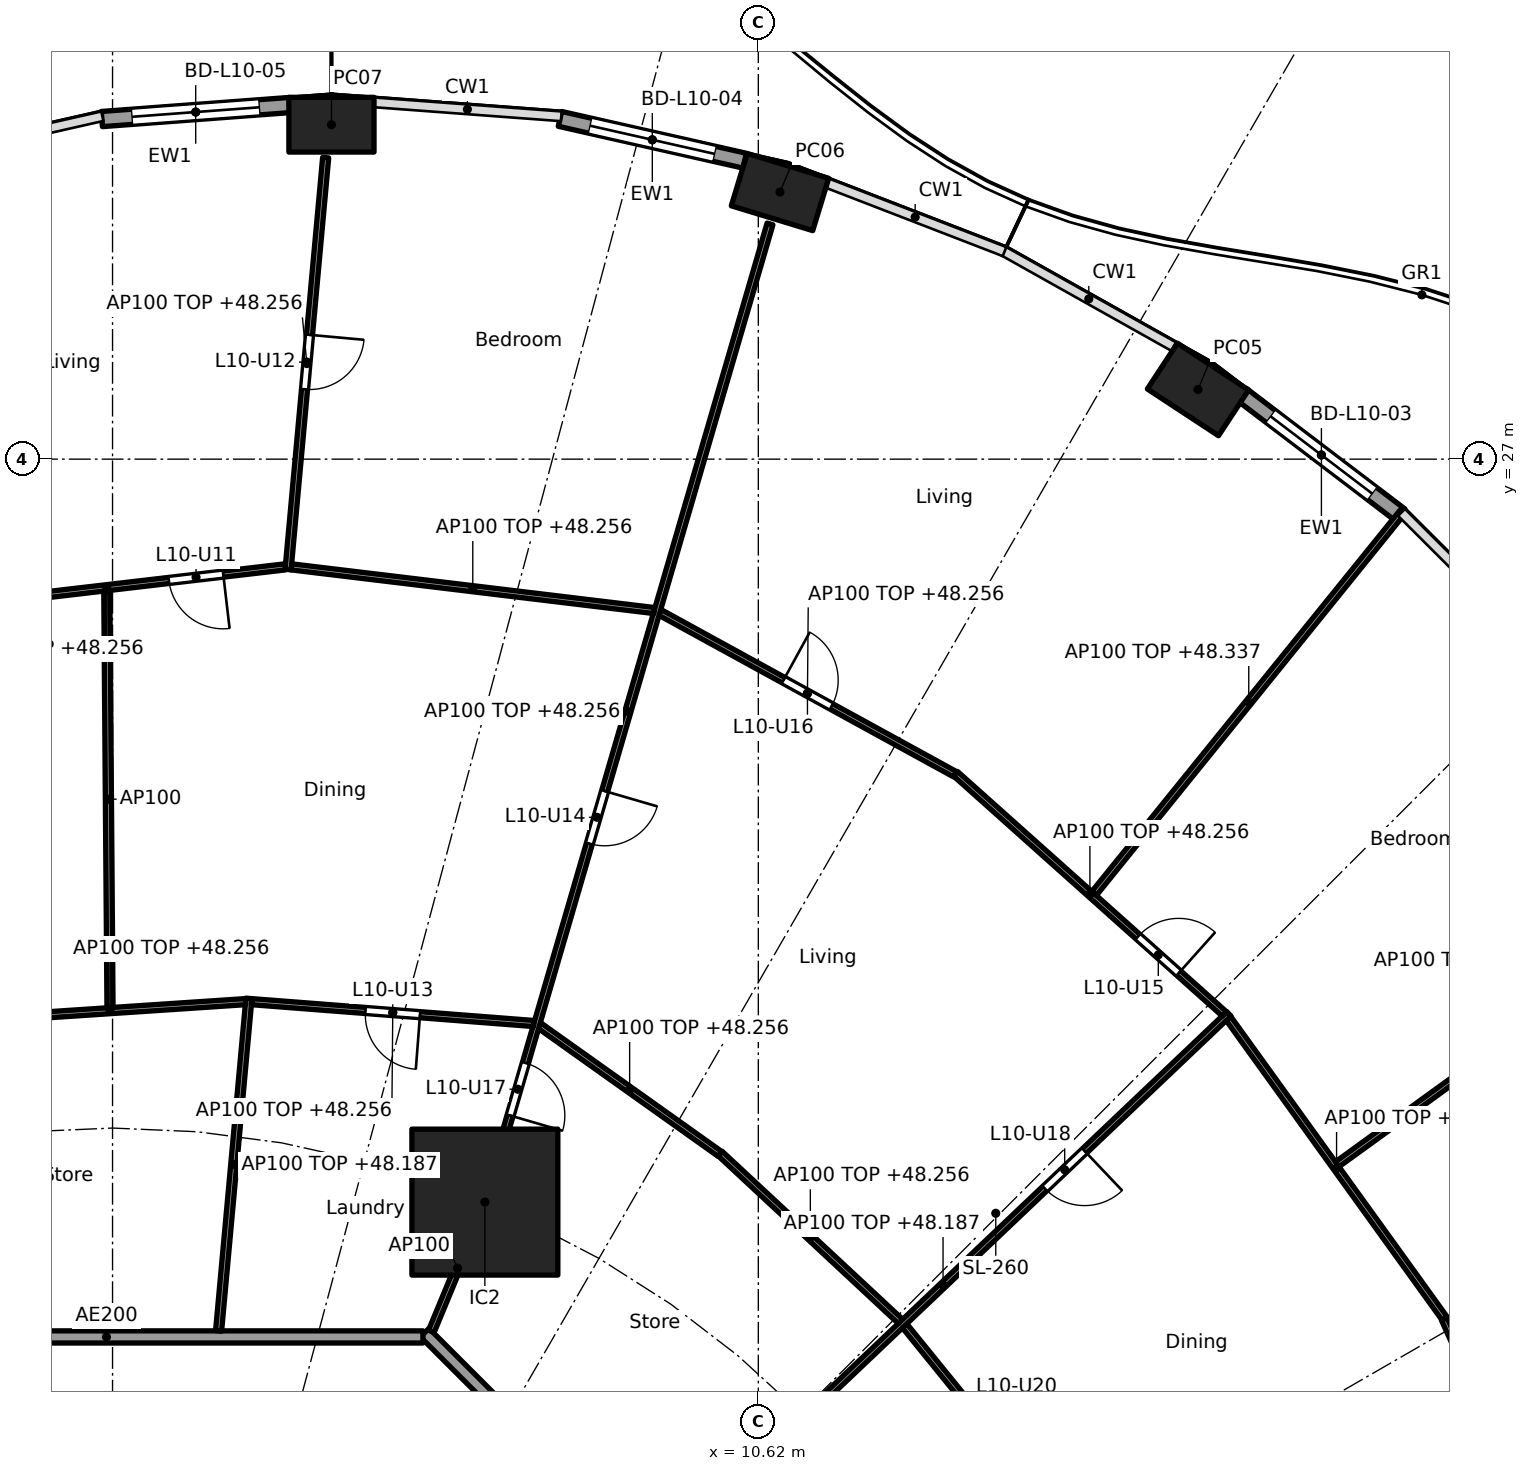
"""IFC4 building model, lengths in metres.
Left out: names, types, materials, properties, quantities, classifications, styles, units other than length and angle.
Written with IfcOpenShell. Run it as: python <this file> out.ifc"""

import sys

from ifc_helpers import new_model, si_unit, direction, frame, frame_2d, origin, origin_2d, place, context, subcontext, project, spatial, rectangle, hollow_rectangle, extrude, element, fill, save


model = new_model("IFC4")
c1 = context("Model", 3, precision=1e-05, world=origin(), true_north=direction((0.0, 1.0)))
c2 = subcontext(c1, "Body", "Model", "MODEL_VIEW")
j1 = project(units=[si_unit("LENGTHUNIT", "METRE"), si_unit("PLANEANGLEUNIT", "RADIAN")], contexts=[c1])
p1 = place(None, origin())
s1 = spatial("IfcSite", under=j1, at=p1, CompositionType="ELEMENT")
p2 = place(p1, origin())
s2 = spatial("IfcBuilding", under=s1, at=p2, CompositionType="ELEMENT")
p3 = place(p2, frame((0.0, 0.0, 45.5)))
s3 = spatial("IfcBuildingStorey", under=s2, at=p3, CompositionType="ELEMENT", Elevation=45.5)
for number, where, z_axis, x_axis in (
    (1, (17.85, 28.146, 0.0), (0.0, 0.0, 1.0), (-0.836, 0.549, 0.0)),
    (2, (10.976, 31.393, 0.0), (0.0, 0.0, 1.0), (-0.957, 0.292, 0.0)),
    (3, (3.6, 32.5, 0.0), (0.0, 0.0, 1.0), (-1.0, 0.0, 0.0)),
):
    element("IfcColumn", number, at=place(p3, frame(where, z_axis=z_axis, x_axis=x_axis)), inside=s3, PredefinedType="COLUMN", context=c2, shape_type="SweptSolid", body=[
        extrude(hollow_rectangle(XDim=1.4, YDim=0.9, WallThickness=0.05, at=origin_2d()), origin(), (0.0, 0.0, 1.0), 3.7),
    ])
p4 = place(p3, frame((6.123, 14.782, 0.0), z_axis=(0.0, 0.0, 1.0), x_axis=(1.0, 0.0, 0.0)))
e4 = element("IfcColumn", 4, at=p4, inside=s3, PredefinedType="COLUMN", context=c2, shape_type="SweptSolid", body=[
    extrude(rectangle(XDim=2.4, YDim=2.4, at=origin_2d()), origin(), (0.0, 0.0, 1.0), 3.7),
])
p5 = place(p3, frame((18.582, 28.056, 0.0), z_axis=(0.0, 0.0, 1.0), x_axis=(0.796022293214, -0.605267303517, 0.0)))
e5 = element("IfcWall", 5, at=p5, inside=s3, PredefinedType="SOLIDWALL", context=c2, shape_type="SweptSolid", body=[
    extrude(rectangle(XDim=3.262, YDim=0.25, at=frame_2d((1.631, 0.0))), origin(), (0.0, 0.0, 1.0), 3.44),
])
p6 = place(p5, frame((0.581, 0.0, 0.0)))
e6 = element("IfcOpeningElement", 6, at=p6, cuts=e5, PredefinedType="OPENING", context=c2, shape_type="SweptSolid", body=[
    extrude(rectangle(XDim=2.1, YDim=2.4, at=frame_2d((1.05, 1.2))), frame((0.0, 0.135, 0.0), z_axis=(0.0, -1.0, 0.0), x_axis=(1.0, 0.0, 0.0)), (0.0, 0.0, 1.0), 0.27),
])
p7 = place(p3, frame((7.358, 32.596, 0.0), z_axis=(0.0, 0.0, 1.0), x_axis=(0.97533495413, -0.220729987208, 0.0)))
e7 = element("IfcWall", 7, at=p7, inside=s3, PredefinedType="SOLIDWALL", context=c2, shape_type="SweptSolid", body=[
    extrude(rectangle(XDim=3.115, YDim=0.25, at=frame_2d((1.557, 0.0))), origin(), (0.0, 0.0, 1.0), 3.44),
])
p8 = place(p7, frame((0.507, 0.0, 0.0)))
e8 = element("IfcOpeningElement", 8, at=p8, cuts=e7, PredefinedType="OPENING", context=c2, shape_type="SweptSolid", body=[
    extrude(rectangle(XDim=2.1, YDim=2.4, at=frame_2d((1.05, 1.2))), frame((0.0, 0.135, 0.0), z_axis=(0.0, -1.0, 0.0), x_axis=(1.0, 0.0, 0.0)), (0.0, 0.0, 1.0), 0.27),
])
p9 = place(p3, frame((-0.176, 32.593, 0.0), z_axis=(0.0, 0.0, 1.0), x_axis=(0.997230834878, 0.074368420505, 0.0)))
e9 = element("IfcWall", 9, at=p9, inside=s3, PredefinedType="SOLIDWALL", context=c2, shape_type="SweptSolid", body=[
    extrude(rectangle(XDim=3.096, YDim=0.25, at=frame_2d((1.548, 0.0))), origin(), (0.0, 0.0, 1.0), 3.44),
])
p10 = place(p9, frame((0.498, 0.0, 0.0)))
e10 = element("IfcOpeningElement", 10, at=p10, cuts=e9, PredefinedType="OPENING", context=c2, shape_type="SweptSolid", body=[
    extrude(rectangle(XDim=2.1, YDim=2.4, at=frame_2d((1.05, 1.2))), frame((0.0, 0.135, 0.0), z_axis=(0.0, -1.0, 0.0), x_axis=(1.0, 0.0, 0.0)), (0.0, 0.0, 1.0), 0.27),
])
p11 = place(p3, frame((12.635, 5.134, 0.0), z_axis=(0.0, 0.0, 1.0), x_axis=(-0.707106781187, 0.707106781187, 0.0)))
e11 = element("IfcWall", 11, at=p11, inside=s3, PredefinedType="PARTITIONING", context=c2, shape_type="SweptSolid", body=[
    extrude(rectangle(XDim=10.609, YDim=0.2, at=frame_2d((5.305, 0.0))), origin(), (0.0, 0.0, 1.0), 3.44),
])
p12 = place(p3, frame((5.104, 12.565, 0.0), z_axis=(0.0, 0.0, 1.0), x_axis=(-1.0, 0.0, 0.0)))
e12 = element("IfcWall", 12, at=p12, inside=s3, PredefinedType="PARTITIONING", context=c2, shape_type="SweptSolid", body=[
    extrude(rectangle(XDim=10.409, YDim=0.2, at=frame_2d((5.205, 0.0))), origin(), (0.0, 0.0, 1.0), 3.44),
])
p13 = place(p3, frame((24.273, 7.584, 0.0), z_axis=(0.0, 0.0, 1.0), x_axis=(-0.410201529109, 0.911994904326, 0.0)))
e13 = element("IfcWall", 13, at=p13, inside=s3, PredefinedType="PARTITIONING", context=c2, shape_type="SweptSolid", body=[
    extrude(rectangle(XDim=5.787, YDim=0.1, at=frame_2d((2.894, 0.0))), origin(), (0.0, 0.0, 1.0), 2.756),
])
p14 = place(p13, frame((2.444, 0.0, 0.0)))
e14 = element("IfcOpeningElement", 14, at=p14, cuts=e13, PredefinedType="OPENING", context=c2, shape_type="SweptSolid", body=[
    extrude(rectangle(XDim=0.9, YDim=2.1, at=frame_2d((0.45, 1.05))), frame((0.0, 0.06, 0.0), z_axis=(0.0, -1.0, 0.0), x_axis=(1.0, 0.0, 0.0)), (0.0, 0.0, 1.0), 0.12),
])
p15 = place(p3, frame((15.614, 9.559, 0.0), z_axis=(0.0, 0.0, 1.0), x_axis=(-0.63012473344, 0.776493928056, 0.0)))
e15 = element("IfcWall", 15, at=p15, inside=s3, PredefinedType="PARTITIONING", context=c2, shape_type="SweptSolid", body=[
    extrude(rectangle(XDim=4.106, YDim=0.1, at=frame_2d((2.053, 0.0))), origin(), (0.0, 0.0, 1.0), 2.756),
])
p16 = place(p15, frame((1.628, 0.0, 0.0)))
e16 = element("IfcOpeningElement", 16, at=p16, cuts=e15, PredefinedType="OPENING", context=c2, shape_type="SweptSolid", body=[
    extrude(rectangle(XDim=0.9, YDim=2.1, at=frame_2d((0.45, 1.05))), frame((0.0, 0.06, 0.0), z_axis=(0.0, -1.0, 0.0), x_axis=(1.0, 0.0, 0.0)), (0.0, 0.0, 1.0), 0.12),
])
p17 = place(p3, frame((21.908, 12.866, 0.0), z_axis=(0.0, 0.0, 1.0), x_axis=(-0.584558392935, 0.811351640936, 0.0)))
e17 = element("IfcWall", 17, at=p17, inside=s3, PredefinedType="PARTITIONING", context=c2, shape_type="SweptSolid", body=[
    extrude(rectangle(XDim=6.084, YDim=0.1, at=frame_2d((3.042, 0.0))), origin(), (0.0, 0.0, 1.0), 2.756),
])
p18 = place(p3, frame((20.141, 15.405, 0.0), z_axis=(0.0, 0.0, 1.0), x_axis=(0.809834895779, 0.58665785734, 0.0)))
e18 = element("IfcWall", 18, at=p18, inside=s3, PredefinedType="PARTITIONING", context=c2, shape_type="SweptSolid", body=[
    extrude(rectangle(XDim=7.945, YDim=0.1, at=frame_2d((3.973, 0.0))), origin(), (0.0, 0.0, 1.0), 2.837),
])
p19 = place(p3, frame((8.957, 8.953, 0.0), z_axis=(0.0, 0.0, 1.0), x_axis=(0.725250022034, 0.688485588476, 0.0)))
e19 = element("IfcWall", 19, at=p19, inside=s3, PredefinedType="PARTITIONING", context=c2, shape_type="SweptSolid", body=[
    extrude(rectangle(XDim=12.963, YDim=0.1, at=frame_2d((6.481, 0.0))), origin(), (0.0, 0.0, 1.0), 2.687),
])
p20 = place(p19, frame((8.79, 0.0, 0.0)))
e20 = element("IfcOpeningElement", 20, at=p20, cuts=e19, PredefinedType="OPENING", context=c2, shape_type="SweptSolid", body=[
    extrude(rectangle(XDim=0.9, YDim=2.1, at=frame_2d((0.45, 1.05))), frame((0.0, 0.06, 0.0), z_axis=(0.0, -1.0, 0.0), x_axis=(1.0, 0.0, 0.0)), (0.0, 0.0, 1.0), 0.12),
])
p21 = place(p3, frame((12.958, 12.82, 0.0), z_axis=(0.0, 0.0, 1.0), x_axis=(-0.732028724098, 0.681273768096, 0.0)))
e21 = element("IfcWall", 21, at=p21, inside=s3, PredefinedType="PARTITIONING", context=c2, shape_type="SweptSolid", body=[
    extrude(rectangle(XDim=4.05, YDim=0.1, at=frame_2d((2.025, 0.0))), origin(), (0.0, 0.0, 1.0), 2.756),
])
p22 = place(p3, frame((18.285, 17.877, 0.0), z_axis=(0.0, 0.0, 1.0), x_axis=(-0.745812746724, 0.666155647596, 0.0)))
e22 = element("IfcWall", 22, at=p22, inside=s3, PredefinedType="PARTITIONING", context=c2, shape_type="SweptSolid", body=[
    extrude(rectangle(XDim=5.931, YDim=0.1, at=frame_2d((2.965, 0.0))), origin(), (0.0, 0.0, 1.0), 2.756),
])
p23 = place(p22, frame((1.008, 0.0, 0.0)))
e23 = element("IfcOpeningElement", 23, at=p23, cuts=e22, PredefinedType="OPENING", context=c2, shape_type="SweptSolid", body=[
    extrude(rectangle(XDim=0.9, YDim=2.1, at=frame_2d((0.45, 1.05))), frame((0.0, 0.06, 0.0), z_axis=(0.0, -1.0, 0.0), x_axis=(1.0, 0.0, 0.0)), (0.0, 0.0, 1.0), 0.12),
])
p24 = place(p3, frame((16.142, 19.858, 0.0), z_axis=(0.0, 0.0, 1.0), x_axis=(0.628738066508, 0.777617157555, 0.0)))
e24 = element("IfcWall", 24, at=p24, inside=s3, PredefinedType="PARTITIONING", context=c2, shape_type="SweptSolid", body=[
    extrude(rectangle(XDim=8.091, YDim=0.1, at=frame_2d((4.045, 0.0))), origin(), (0.0, 0.0, 1.0), 2.837),
])
p25 = place(p3, frame((9.989, 15.574, 0.0), z_axis=(0.0, 0.0, 1.0), x_axis=(-0.81494477814, 0.57953861699, 0.0)))
e25 = element("IfcWall", 25, at=p25, inside=s3, PredefinedType="PARTITIONING", context=c2, shape_type="SweptSolid", body=[
    extrude(rectangle(XDim=3.644, YDim=0.1, at=frame_2d((1.822, 0.0))), origin(), (0.0, 0.0, 1.0), 2.756),
])
p26 = place(p3, frame((13.855, 21.818, 0.0), z_axis=(0.0, 0.0, 1.0), x_axis=(-0.876794415294, 0.480865421203, 0.0)))
e26 = element("IfcWall", 26, at=p26, inside=s3, PredefinedType="PARTITIONING", context=c2, shape_type="SweptSolid", body=[
    extrude(rectangle(XDim=5.536, YDim=0.1, at=frame_2d((2.768, 0.0))), origin(), (0.0, 0.0, 1.0), 2.756),
])
p27 = place(p26, frame((2.318, 0.0, 0.0)))
e27 = element("IfcOpeningElement", 27, at=p27, cuts=e26, PredefinedType="OPENING", context=c2, shape_type="SweptSolid", body=[
    extrude(rectangle(XDim=0.9, YDim=2.1, at=frame_2d((0.45, 1.05))), frame((0.0, 0.06, 0.0), z_axis=(0.0, -1.0, 0.0), x_axis=(1.0, 0.0, 0.0)), (0.0, 0.0, 1.0), 0.12),
])
p28 = place(p3, frame((5.243, 12.657, 0.0), z_axis=(0.0, 0.0, 1.0), x_axis=(0.382719158442, 0.923864733477, 0.0)))
e28 = element("IfcWall", 28, at=p28, inside=s3, PredefinedType="PARTITIONING", context=c2, shape_type="SweptSolid", body=[
    extrude(rectangle(XDim=2.25, YDim=0.1, at=frame_2d((1.125, 0.0))), origin(), (0.0, 0.0, 1.0), 3.44),
])
p29 = place(p3, frame((6.137, 14.83, 0.0), z_axis=(0.0, 0.0, 1.0), x_axis=(0.27985745069, 0.960041565399, 0.0)))
e29 = element("IfcWall", 29, at=p29, inside=s3, PredefinedType="PARTITIONING", context=c2, shape_type="SweptSolid", body=[
    extrude(rectangle(XDim=16.705, YDim=0.1, at=frame_2d((8.353, 0.0))), origin(), (0.0, 0.0, 1.0), 2.756),
])
p30 = place(p29, frame((6.091, 0.0, 0.0)))
e30 = element("IfcOpeningElement", 30, at=p30, cuts=e29, PredefinedType="OPENING", context=c2, shape_type="SweptSolid", body=[
    extrude(rectangle(XDim=0.9, YDim=2.1, at=frame_2d((0.45, 1.05))), frame((0.0, 0.06, 0.0), z_axis=(0.0, -1.0, 0.0), x_axis=(1.0, 0.0, 0.0)), (0.0, 0.0, 1.0), 0.12),
])
p31 = place(p29, frame((1.434, 0.0, 0.0)))
e31 = element("IfcOpeningElement", 31, at=p31, cuts=e29, PredefinedType="OPENING", context=c2, shape_type="SweptSolid", body=[
    extrude(rectangle(XDim=0.9, YDim=2.1, at=frame_2d((0.45, 1.05))), frame((0.0, 0.06, 0.0), z_axis=(0.0, -1.0, 0.0), x_axis=(1.0, 0.0, 0.0)), (0.0, 0.0, 1.0), 0.12),
])
p32 = place(p3, frame((6.928, 17.719, 0.0), z_axis=(0.0, 0.0, 1.0), x_axis=(-0.997017959142, 0.077169872028, 0.0)))
e32 = element("IfcWall", 32, at=p32, inside=s3, PredefinedType="PARTITIONING", context=c2, shape_type="SweptSolid", body=[
    extrude(rectangle(XDim=4.654, YDim=0.1, at=frame_2d((2.327, 0.0))), origin(), (0.0, 0.0, 1.0), 2.756),
])
p33 = place(p32, frame((1.877, 0.0, 0.0)))
e33 = element("IfcOpeningElement", 33, at=p33, cuts=e32, PredefinedType="OPENING", context=c2, shape_type="SweptSolid", body=[
    extrude(rectangle(XDim=0.9, YDim=2.1, at=frame_2d((0.45, 1.05))), frame((0.0, 0.06, 0.0), z_axis=(0.0, -1.0, 0.0), x_axis=(1.0, 0.0, 0.0)), (0.0, 0.0, 1.0), 0.12),
])
p34 = place(p3, frame((8.907, 24.51, 0.0), z_axis=(0.0, 0.0, 1.0), x_axis=(-0.992836798252, 0.119478416615, 0.0)))
e34 = element("IfcWall", 34, at=p34, inside=s3, PredefinedType="PARTITIONING", context=c2, shape_type="SweptSolid", body=[
    extrude(rectangle(XDim=6.01, YDim=0.1, at=frame_2d((3.005, 0.0))), origin(), (0.0, 0.0, 1.0), 2.756),
])
p35 = place(p3, frame((1.744, 12.664, 0.0), z_axis=(0.0, 0.0, 1.0), x_axis=(0.090888552747, 0.995861070119, 0.0)))
e35 = element("IfcWall", 35, at=p35, inside=s3, PredefinedType="PARTITIONING", context=c2, shape_type="SweptSolid", body=[
    extrude(rectangle(XDim=5.49, YDim=0.1, at=frame_2d((2.745, 0.0))), origin(), (0.0, 0.0, 1.0), 2.687),
])
p36 = place(p3, frame((2.188, 18.079, 0.0), z_axis=(0.0, 0.0, 1.0), x_axis=(-0.997791437766, -0.066424744789, 0.0)))
e36 = element("IfcWall", 36, at=p36, inside=s3, PredefinedType="PARTITIONING", context=c2, shape_type="SweptSolid", body=[
    extrude(rectangle(XDim=4.469, YDim=0.1, at=frame_2d((2.235, 0.0))), origin(), (0.0, 0.0, 1.0), 2.756),
])
p37 = place(p3, frame((2.887, 25.185, 0.0), z_axis=(0.0, 0.0, 1.0), x_axis=(0.090885272046, 0.995861369531, 0.0)))
e37 = element("IfcWall", 37, at=p37, inside=s3, PredefinedType="PARTITIONING", context=c2, shape_type="SweptSolid", body=[
    extrude(rectangle(XDim=6.802, YDim=0.1, at=frame_2d((3.401, 0.0))), origin(), (0.0, 0.0, 1.0), 2.756),
])
p38 = place(p37, frame((2.976, 0.0, 0.0)))
e38 = element("IfcOpeningElement", 38, at=p38, cuts=e37, PredefinedType="OPENING", context=c2, shape_type="SweptSolid", body=[
    extrude(rectangle(XDim=0.9, YDim=2.1, at=frame_2d((0.45, 1.05))), frame((0.0, 0.06, 0.0), z_axis=(0.0, -1.0, 0.0), x_axis=(1.0, 0.0, 0.0)), (0.0, 0.0, 1.0), 0.12),
])
p39 = place(p3, frame((2.842, 25.229, 0.0), z_axis=(0.0, 0.0, 1.0), x_axis=(-0.993255612046, -0.115945198862, 0.0)))
e39 = element("IfcWall", 39, at=p39, inside=s3, PredefinedType="PARTITIONING", context=c2, shape_type="SweptSolid", body=[
    extrude(rectangle(XDim=5.913, YDim=0.1, at=frame_2d((2.956, 0.0))), origin(), (0.0, 0.0, 1.0), 2.756),
])
p40 = place(p39, frame((1.028, 0.0, 0.0)))
e40 = element("IfcOpeningElement", 40, at=p40, cuts=e39, PredefinedType="OPENING", context=c2, shape_type="SweptSolid", body=[
    extrude(rectangle(XDim=0.9, YDim=2.1, at=frame_2d((0.45, 1.05))), frame((0.0, 0.06, 0.0), z_axis=(0.0, -1.0, 0.0), x_axis=(1.0, 0.0, 0.0)), (0.0, 0.0, 1.0), 0.12),
])
p41 = place(p3, frame((-0.042, 17.98, 0.0), z_axis=(0.0, 0.0, 1.0), x_axis=(-0.007692080119, 0.999970415514, 0.0)))
e41 = element("IfcWall", 41, at=p41, inside=s3, PredefinedType="PARTITIONING", context=c2, shape_type="SweptSolid", body=[
    extrude(rectangle(XDim=6.856, YDim=0.1, at=frame_2d((3.428, 0.0))), origin(), (0.0, 0.0, 1.0), 3.44),
])
p42 = place(p6, origin())
e42 = element("IfcDoor", 42, at=p42, inside=s3, OperationType="SLIDING_TO_LEFT", PredefinedType="DOOR", context=c2, shape_type="SweptSolid", body=[
    extrude(rectangle(XDim=2.1, YDim=2.4, at=frame_2d((1.05, 1.2))), frame((0.0, 0.025, 0.0), z_axis=(0.0, -1.0, 0.0), x_axis=(1.0, 0.0, 0.0)), (0.0, 0.0, 1.0), 0.05),
])
fill(e6, e42)
p43 = place(p8, origin())
e43 = element("IfcDoor", 43, at=p43, inside=s3, OperationType="SLIDING_TO_LEFT", PredefinedType="DOOR", context=c2, shape_type="SweptSolid", body=[
    extrude(rectangle(XDim=2.1, YDim=2.4, at=frame_2d((1.05, 1.2))), frame((0.0, 0.025, 0.0), z_axis=(0.0, -1.0, 0.0), x_axis=(1.0, 0.0, 0.0)), (0.0, 0.0, 1.0), 0.05),
])
fill(e8, e43)
p44 = place(p10, origin())
e44 = element("IfcDoor", 44, at=p44, inside=s3, OperationType="SLIDING_TO_LEFT", PredefinedType="DOOR", context=c2, shape_type="SweptSolid", body=[
    extrude(rectangle(XDim=2.1, YDim=2.4, at=frame_2d((1.05, 1.2))), frame((0.0, 0.025, 0.0), z_axis=(0.0, -1.0, 0.0), x_axis=(1.0, 0.0, 0.0)), (0.0, 0.0, 1.0), 0.05),
])
fill(e10, e44)
p45 = place(p40, origin())
e45 = element("IfcDoor", 45, at=p45, inside=s3, OperationType="SINGLE_SWING_LEFT", PredefinedType="DOOR", context=c2, shape_type="SweptSolid", body=[
    extrude(rectangle(XDim=0.9, YDim=2.1, at=frame_2d((0.45, 1.05))), frame((0.0, 0.025, 0.0), z_axis=(0.0, -1.0, 0.0), x_axis=(1.0, 0.0, 0.0)), (0.0, 0.0, 1.0), 0.05),
])
fill(e40, e45)
p46 = place(p38, frame((0.9, 0.0, 0.0), x_axis=(-1.0, 0.0, 0.0)))
e46 = element("IfcDoor", 46, at=p46, inside=s3, OperationType="SINGLE_SWING_LEFT", PredefinedType="DOOR", context=c2, shape_type="SweptSolid", body=[
    extrude(rectangle(XDim=0.9, YDim=2.1, at=frame_2d((0.45, 1.05))), frame((0.0, 0.025, 0.0), z_axis=(0.0, -1.0, 0.0), x_axis=(1.0, 0.0, 0.0)), (0.0, 0.0, 1.0), 0.05),
])
fill(e38, e46)
p47 = place(p33, origin())
e47 = element("IfcDoor", 47, at=p47, inside=s3, OperationType="SINGLE_SWING_LEFT", PredefinedType="DOOR", context=c2, shape_type="SweptSolid", body=[
    extrude(rectangle(XDim=0.9, YDim=2.1, at=frame_2d((0.45, 1.05))), frame((0.0, 0.025, 0.0), z_axis=(0.0, -1.0, 0.0), x_axis=(1.0, 0.0, 0.0)), (0.0, 0.0, 1.0), 0.05),
])
fill(e33, e47)
p48 = place(p30, frame((0.9, 0.0, 0.0), x_axis=(-1.0, 0.0, 0.0)))
e48 = element("IfcDoor", 48, at=p48, inside=s3, OperationType="SINGLE_SWING_LEFT", PredefinedType="DOOR", context=c2, shape_type="SweptSolid", body=[
    extrude(rectangle(XDim=0.9, YDim=2.1, at=frame_2d((0.45, 1.05))), frame((0.0, 0.025, 0.0), z_axis=(0.0, -1.0, 0.0), x_axis=(1.0, 0.0, 0.0)), (0.0, 0.0, 1.0), 0.05),
])
fill(e30, e48)
p49 = place(p23, frame((0.9, 0.0, 0.0), x_axis=(-1.0, 0.0, 0.0)))
e49 = element("IfcDoor", 49, at=p49, inside=s3, OperationType="SINGLE_SWING_RIGHT", PredefinedType="DOOR", context=c2, shape_type="SweptSolid", body=[
    extrude(rectangle(XDim=0.9, YDim=2.1, at=frame_2d((0.45, 1.05))), frame((0.0, 0.025, 0.0), z_axis=(0.0, -1.0, 0.0), x_axis=(1.0, 0.0, 0.0)), (0.0, 0.0, 1.0), 0.05),
])
fill(e23, e49)
p50 = place(p27, frame((0.9, 0.0, 0.0), x_axis=(-1.0, 0.0, 0.0)))
e50 = element("IfcDoor", 50, at=p50, inside=s3, OperationType="SINGLE_SWING_LEFT", PredefinedType="DOOR", context=c2, shape_type="SweptSolid", body=[
    extrude(rectangle(XDim=0.9, YDim=2.1, at=frame_2d((0.45, 1.05))), frame((0.0, 0.025, 0.0), z_axis=(0.0, -1.0, 0.0), x_axis=(1.0, 0.0, 0.0)), (0.0, 0.0, 1.0), 0.05),
])
fill(e27, e50)
p51 = place(p31, frame((0.9, 0.0, 0.0), x_axis=(-1.0, 0.0, 0.0)))
e51 = element("IfcDoor", 51, at=p51, inside=s3, OperationType="SINGLE_SWING_RIGHT", PredefinedType="DOOR", context=c2, shape_type="SweptSolid", body=[
    extrude(rectangle(XDim=0.9, YDim=2.1, at=frame_2d((0.45, 1.05))), frame((0.0, 0.025, 0.0), z_axis=(0.0, -1.0, 0.0), x_axis=(1.0, 0.0, 0.0)), (0.0, 0.0, 1.0), 0.05),
])
fill(e31, e51)
p52 = place(p20, frame((0.9, 0.0, 0.0), x_axis=(-1.0, 0.0, 0.0)))
e52 = element("IfcDoor", 52, at=p52, inside=s3, OperationType="SINGLE_SWING_LEFT", PredefinedType="DOOR", context=c2, shape_type="SweptSolid", body=[
    extrude(rectangle(XDim=0.9, YDim=2.1, at=frame_2d((0.45, 1.05))), frame((0.0, 0.025, 0.0), z_axis=(0.0, -1.0, 0.0), x_axis=(1.0, 0.0, 0.0)), (0.0, 0.0, 1.0), 0.05),
])
fill(e20, e52)
save(model, sys.argv[1])
